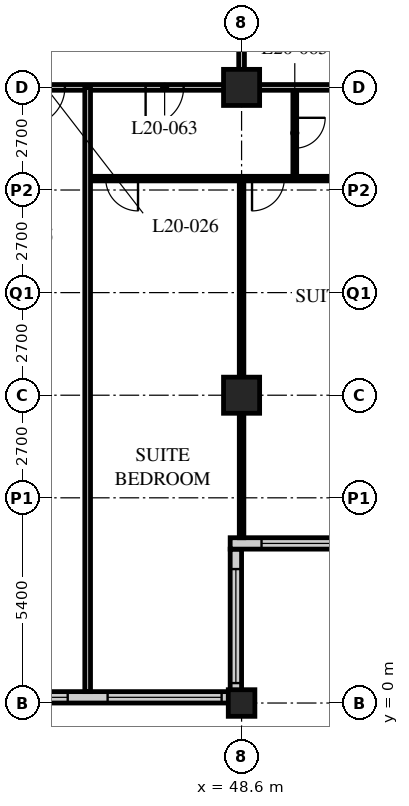
"""IFC4 building model, lengths in metres.
Left out: names, types, materials, properties, quantities, classifications, styles, units other than length and angle.
Written with IfcOpenShell. Run it as: python <this file> out.ifc"""

import sys

from ifc_helpers import new_model, si_unit, direction, frame, frame_2d, origin, origin_2d, place, context, subcontext, project, spatial, rectangle, hollow_rectangle, extrude, element, fill, save


model = new_model("IFC4")
c1 = context("Model", 3, precision=1e-05, world=origin(), true_north=direction((0.0, 1.0)))
c2 = subcontext(c1, "Body", "Model", "MODEL_VIEW")
j1 = project(units=[si_unit("LENGTHUNIT", "METRE"), si_unit("PLANEANGLEUNIT", "RADIAN")], contexts=[c1])
p1 = place(None, origin())
s1 = spatial("IfcSite", under=j1, at=p1, CompositionType="ELEMENT")
p2 = place(p1, origin())
s2 = spatial("IfcBuilding", under=s1, at=p2, CompositionType="ELEMENT")
p3 = place(p2, frame((0.0, 0.0, 80.6)))
s3 = spatial("IfcBuildingStorey", under=s2, at=p3, CompositionType="ELEMENT", Elevation=80.6)
p4 = place(p3, frame((48.6, 0.0, 0.0), z_axis=(0.0, 0.0, 1.0), x_axis=(1.0, 0.0, 0.0)))
e1 = element("IfcColumn", 1, at=p4, inside=s3, PredefinedType="COLUMN", context=c2, shape_type="SweptSolid", body=[
    extrude(hollow_rectangle(XDim=0.7, YDim=0.7, WallThickness=0.06, at=origin_2d()), origin(), (0.0, 0.0, 1.0), 3.4),
])
for number, where, z_axis, x_axis in (
    (2, (48.6, 8.1, 0.0), (0.0, 0.0, 1.0), (1.0, 0.0, 0.0)),
    (3, (48.6, 16.2, 0.0), (0.0, 0.0, 1.0), (1.0, 0.0, 0.0)),
):
    element("IfcColumn", number, at=place(p3, frame(where, z_axis=z_axis, x_axis=x_axis)), inside=s3, PredefinedType="COLUMN", context=c2, shape_type="SweptSolid", body=[
        extrude(hollow_rectangle(XDim=0.95, YDim=0.95, WallThickness=0.095, at=origin_2d()), origin(), (0.0, 0.0, 1.0), 3.4),
    ])
p5 = place(p3, frame((8.4, 0.15, 0.0), z_axis=(0.0, 0.0, 1.0), x_axis=(1.0, 0.0, 0.0)))
e4 = element("IfcWall", 4, at=p5, inside=s3, PredefinedType="SOLIDWALL", context=c2, shape_type="SweptSolid", body=[
    extrude(rectangle(XDim=40.2, YDim=0.3, at=frame_2d((20.1, 0.0))), origin(), (0.0, 0.0, 1.0), 3.19),
])
p6 = place(p5, frame((0.225, 0.0, 0.9)))
e5 = element("IfcOpeningElement", 5, at=p6, cuts=e4, PredefinedType="OPENING", context=c2, shape_type="SweptSolid", body=[
    extrude(rectangle(XDim=3.0, YDim=1.5, at=frame_2d((1.5, 0.75))), frame((0.0, 0.16, 0.0), z_axis=(0.0, -1.0, 0.0), x_axis=(1.0, 0.0, 0.0)), (0.0, 0.0, 1.0), 0.32),
])
p7 = place(p5, frame((4.275, 0.0, 0.9)))
e6 = element("IfcOpeningElement", 6, at=p7, cuts=e4, PredefinedType="OPENING", context=c2, shape_type="SweptSolid", body=[
    extrude(rectangle(XDim=3.0, YDim=1.5, at=frame_2d((1.5, 0.75))), frame((0.0, 0.16, 0.0), z_axis=(0.0, -1.0, 0.0), x_axis=(1.0, 0.0, 0.0)), (0.0, 0.0, 1.0), 0.32),
])
p8 = place(p5, frame((8.325, 0.0, 0.9)))
e7 = element("IfcOpeningElement", 7, at=p8, cuts=e4, PredefinedType="OPENING", context=c2, shape_type="SweptSolid", body=[
    extrude(rectangle(XDim=3.0, YDim=1.5, at=frame_2d((1.5, 0.75))), frame((0.0, 0.16, 0.0), z_axis=(0.0, -1.0, 0.0), x_axis=(1.0, 0.0, 0.0)), (0.0, 0.0, 1.0), 0.32),
])
p9 = place(p5, frame((12.375, 0.0, 0.9)))
e8 = element("IfcOpeningElement", 8, at=p9, cuts=e4, PredefinedType="OPENING", context=c2, shape_type="SweptSolid", body=[
    extrude(rectangle(XDim=3.0, YDim=1.5, at=frame_2d((1.5, 0.75))), frame((0.0, 0.16, 0.0), z_axis=(0.0, -1.0, 0.0), x_axis=(1.0, 0.0, 0.0)), (0.0, 0.0, 1.0), 0.32),
])
p10 = place(p5, frame((16.425, 0.0, 0.9)))
e9 = element("IfcOpeningElement", 9, at=p10, cuts=e4, PredefinedType="OPENING", context=c2, shape_type="SweptSolid", body=[
    extrude(rectangle(XDim=3.0, YDim=1.5, at=frame_2d((1.5, 0.75))), frame((0.0, 0.16, 0.0), z_axis=(0.0, -1.0, 0.0), x_axis=(1.0, 0.0, 0.0)), (0.0, 0.0, 1.0), 0.32),
])
p11 = place(p5, frame((20.475, 0.0, 0.9)))
e10 = element("IfcOpeningElement", 10, at=p11, cuts=e4, PredefinedType="OPENING", context=c2, shape_type="SweptSolid", body=[
    extrude(rectangle(XDim=3.0, YDim=1.5, at=frame_2d((1.5, 0.75))), frame((0.0, 0.16, 0.0), z_axis=(0.0, -1.0, 0.0), x_axis=(1.0, 0.0, 0.0)), (0.0, 0.0, 1.0), 0.32),
])
p12 = place(p5, frame((24.525, 0.0, 0.9)))
e11 = element("IfcOpeningElement", 11, at=p12, cuts=e4, PredefinedType="OPENING", context=c2, shape_type="SweptSolid", body=[
    extrude(rectangle(XDim=3.0, YDim=1.5, at=frame_2d((1.5, 0.75))), frame((0.0, 0.16, 0.0), z_axis=(0.0, -1.0, 0.0), x_axis=(1.0, 0.0, 0.0)), (0.0, 0.0, 1.0), 0.32),
])
p13 = place(p5, frame((28.575, 0.0, 0.9)))
e12 = element("IfcOpeningElement", 12, at=p13, cuts=e4, PredefinedType="OPENING", context=c2, shape_type="SweptSolid", body=[
    extrude(rectangle(XDim=3.0, YDim=1.5, at=frame_2d((1.5, 0.75))), frame((0.0, 0.16, 0.0), z_axis=(0.0, -1.0, 0.0), x_axis=(1.0, 0.0, 0.0)), (0.0, 0.0, 1.0), 0.32),
])
p14 = place(p5, frame((32.625, 0.0, 0.9)))
e13 = element("IfcOpeningElement", 13, at=p14, cuts=e4, PredefinedType="OPENING", context=c2, shape_type="SweptSolid", body=[
    extrude(rectangle(XDim=3.0, YDim=1.5, at=frame_2d((1.5, 0.75))), frame((0.0, 0.16, 0.0), z_axis=(0.0, -1.0, 0.0), x_axis=(1.0, 0.0, 0.0)), (0.0, 0.0, 1.0), 0.32),
])
p15 = place(p5, frame((36.675, 0.0, 0.9)))
e14 = element("IfcOpeningElement", 14, at=p15, cuts=e4, PredefinedType="OPENING", context=c2, shape_type="SweptSolid", body=[
    extrude(rectangle(XDim=3.0, YDim=1.5, at=frame_2d((1.5, 0.75))), frame((0.0, 0.16, 0.0), z_axis=(0.0, -1.0, 0.0), x_axis=(1.0, 0.0, 0.0)), (0.0, 0.0, 1.0), 0.32),
])
p16 = place(p3, frame((48.45, 0.3, 0.0), z_axis=(0.0, 0.0, 1.0), x_axis=(0.0, 1.0, 0.0)))
e15 = element("IfcWall", 15, at=p16, inside=s3, PredefinedType="SOLIDWALL", context=c2, shape_type="SweptSolid", body=[
    extrude(rectangle(XDim=3.75, YDim=0.3, at=frame_2d((1.875, 0.0))), origin(), (0.0, 0.0, 1.0), 3.19),
])
p17 = place(p16, frame((0.225, 0.0, 0.9)))
e16 = element("IfcOpeningElement", 16, at=p17, cuts=e15, PredefinedType="OPENING", context=c2, shape_type="SweptSolid", body=[
    extrude(rectangle(XDim=3.0, YDim=1.5, at=frame_2d((1.5, 0.75))), frame((0.0, 0.16, 0.0), z_axis=(0.0, -1.0, 0.0), x_axis=(1.0, 0.0, 0.0)), (0.0, 0.0, 1.0), 0.32),
])
p18 = place(p3, frame((48.3, 4.2, 0.0), z_axis=(0.0, 0.0, 1.0), x_axis=(1.0, 0.0, 0.0)))
e17 = element("IfcWall", 17, at=p18, inside=s3, PredefinedType="SOLIDWALL", context=c2, shape_type="SweptSolid", body=[
    extrude(rectangle(XDim=4.35, YDim=0.3, at=frame_2d((2.175, 0.0))), origin(), (0.0, 0.0, 1.0), 3.19),
])
p19 = place(p18, frame((0.825, 0.0, 0.9)))
e18 = element("IfcOpeningElement", 18, at=p19, cuts=e17, PredefinedType="OPENING", context=c2, shape_type="SweptSolid", body=[
    extrude(rectangle(XDim=3.0, YDim=1.5, at=frame_2d((1.5, 0.75))), frame((0.0, 0.16, 0.0), z_axis=(0.0, -1.0, 0.0), x_axis=(1.0, 0.0, 0.0)), (0.0, 0.0, 1.0), 0.32),
])
p20 = place(p3, frame((12.15, 16.2, 0.0), z_axis=(0.0, 0.0, 1.0), x_axis=(1.0, 0.0, 0.0)))
e19 = element("IfcWall", 19, at=p20, inside=s3, PredefinedType="PARTITIONING", context=c2, shape_type="SweptSolid", body=[
    extrude(rectangle(XDim=36.45, YDim=0.15, at=frame_2d((18.225, 0.0))), origin(), (0.0, 0.0, 1.0), 2.428),
])
p21 = place(p20, frame((6.5, 0.0, 0.0)))
e20 = element("IfcOpeningElement", 20, at=p21, cuts=e19, PredefinedType="OPENING", context=c2, shape_type="SweptSolid", body=[
    extrude(rectangle(XDim=1.0, YDim=2.1, at=frame_2d((0.5, 1.05))), frame((0.0, 0.085, 0.0), z_axis=(0.0, -1.0, 0.0), x_axis=(1.0, 0.0, 0.0)), (0.0, 0.0, 1.0), 0.17),
])
p22 = place(p20, frame((8.4, 0.0, 0.0)))
e21 = element("IfcOpeningElement", 21, at=p22, cuts=e19, PredefinedType="OPENING", context=c2, shape_type="SweptSolid", body=[
    extrude(rectangle(XDim=1.0, YDim=2.1, at=frame_2d((0.5, 1.05))), frame((0.0, 0.085, 0.0), z_axis=(0.0, -1.0, 0.0), x_axis=(1.0, 0.0, 0.0)), (0.0, 0.0, 1.0), 0.17),
])
p23 = place(p20, frame((14.9, 0.0, 0.0)))
e22 = element("IfcOpeningElement", 22, at=p23, cuts=e19, PredefinedType="OPENING", context=c2, shape_type="SweptSolid", body=[
    extrude(rectangle(XDim=1.0, YDim=2.1, at=frame_2d((0.5, 1.05))), frame((0.0, 0.085, 0.0), z_axis=(0.0, -1.0, 0.0), x_axis=(1.0, 0.0, 0.0)), (0.0, 0.0, 1.0), 0.17),
])
p24 = place(p20, frame((16.5, 0.0, 0.0)))
e23 = element("IfcOpeningElement", 23, at=p24, cuts=e19, PredefinedType="OPENING", context=c2, shape_type="SweptSolid", body=[
    extrude(rectangle(XDim=1.0, YDim=2.1, at=frame_2d((0.5, 1.05))), frame((0.0, 0.085, 0.0), z_axis=(0.0, -1.0, 0.0), x_axis=(1.0, 0.0, 0.0)), (0.0, 0.0, 1.0), 0.17),
])
p25 = place(p20, frame((22.7, 0.0, 0.0)))
e24 = element("IfcOpeningElement", 24, at=p25, cuts=e19, PredefinedType="OPENING", context=c2, shape_type="SweptSolid", body=[
    extrude(rectangle(XDim=1.0, YDim=2.1, at=frame_2d((0.5, 1.05))), frame((0.0, 0.085, 0.0), z_axis=(0.0, -1.0, 0.0), x_axis=(1.0, 0.0, 0.0)), (0.0, 0.0, 1.0), 0.17),
])
p26 = place(p20, frame((24.9, 0.0, 0.0)))
e25 = element("IfcOpeningElement", 25, at=p26, cuts=e19, PredefinedType="OPENING", context=c2, shape_type="SweptSolid", body=[
    extrude(rectangle(XDim=1.0, YDim=2.1, at=frame_2d((0.5, 1.05))), frame((0.0, 0.085, 0.0), z_axis=(0.0, -1.0, 0.0), x_axis=(1.0, 0.0, 0.0)), (0.0, 0.0, 1.0), 0.17),
])
p27 = place(p20, frame((30.8, 0.0, 0.0)))
e26 = element("IfcOpeningElement", 26, at=p27, cuts=e19, PredefinedType="OPENING", context=c2, shape_type="SweptSolid", body=[
    extrude(rectangle(XDim=1.0, YDim=2.1, at=frame_2d((0.5, 1.05))), frame((0.0, 0.085, 0.0), z_axis=(0.0, -1.0, 0.0), x_axis=(1.0, 0.0, 0.0)), (0.0, 0.0, 1.0), 0.17),
])
p28 = place(p20, frame((1.525, 0.0, 0.0)))
e27 = element("IfcOpeningElement", 27, at=p28, cuts=e19, PredefinedType="OPENING", context=c2, shape_type="SweptSolid", body=[
    extrude(rectangle(XDim=1.0, YDim=2.1, at=frame_2d((0.5, 1.05))), frame((0.0, 0.085, 0.0), z_axis=(0.0, -1.0, 0.0), x_axis=(1.0, 0.0, 0.0)), (0.0, 0.0, 1.0), 0.17),
])
p29 = place(p20, frame((33.925, 0.0, 0.0)))
e28 = element("IfcOpeningElement", 28, at=p29, cuts=e19, PredefinedType="OPENING", context=c2, shape_type="SweptSolid", body=[
    extrude(rectangle(XDim=1.0, YDim=2.1, at=frame_2d((0.5, 1.05))), frame((0.0, 0.085, 0.0), z_axis=(0.0, -1.0, 0.0), x_axis=(1.0, 0.0, 0.0)), (0.0, 0.0, 1.0), 0.17),
])
p30 = place(p3, frame((48.6, 16.2, 0.0), z_axis=(0.0, 0.0, 1.0), x_axis=(0.0, 1.0, 0.0)))
e29 = element("IfcWall", 29, at=p30, inside=s3, PredefinedType="PARTITIONING", context=c2, shape_type="SweptSolid", body=[
    extrude(rectangle(XDim=26.1, YDim=0.15, at=frame_2d((13.05, 0.0))), origin(), (0.0, 0.0, 1.0), 2.428),
])
p31 = place(p30, frame((2.75, 0.0, 0.0)))
e30 = element("IfcOpeningElement", 30, at=p31, cuts=e29, PredefinedType="OPENING", context=c2, shape_type="SweptSolid", body=[
    extrude(rectangle(XDim=1.0, YDim=2.1, at=frame_2d((0.5, 1.05))), frame((0.0, 0.085, 0.0), z_axis=(0.0, -1.0, 0.0), x_axis=(1.0, 0.0, 0.0)), (0.0, 0.0, 1.0), 0.17),
])
p32 = place(p30, frame((4.65, 0.0, 0.0)))
e31 = element("IfcOpeningElement", 31, at=p32, cuts=e29, PredefinedType="OPENING", context=c2, shape_type="SweptSolid", body=[
    extrude(rectangle(XDim=1.0, YDim=2.1, at=frame_2d((0.5, 1.05))), frame((0.0, 0.085, 0.0), z_axis=(0.0, -1.0, 0.0), x_axis=(1.0, 0.0, 0.0)), (0.0, 0.0, 1.0), 0.17),
])
p33 = place(p30, frame((13.55, 0.0, 0.0)))
e32 = element("IfcOpeningElement", 32, at=p33, cuts=e29, PredefinedType="OPENING", context=c2, shape_type="SweptSolid", body=[
    extrude(rectangle(XDim=1.0, YDim=2.1, at=frame_2d((0.5, 1.05))), frame((0.0, 0.085, 0.0), z_axis=(0.0, -1.0, 0.0), x_axis=(1.0, 0.0, 0.0)), (0.0, 0.0, 1.0), 0.17),
])
p34 = place(p30, frame((21.65, 0.0, 0.0)))
e33 = element("IfcOpeningElement", 33, at=p34, cuts=e29, PredefinedType="OPENING", context=c2, shape_type="SweptSolid", body=[
    extrude(rectangle(XDim=1.0, YDim=2.1, at=frame_2d((0.5, 1.05))), frame((0.0, 0.085, 0.0), z_axis=(0.0, -1.0, 0.0), x_axis=(1.0, 0.0, 0.0)), (0.0, 0.0, 1.0), 0.17),
])
p35 = place(p3, frame((44.55, 13.8, 0.0), z_axis=(0.0, 0.0, 1.0), x_axis=(1.0, 0.0, 0.0)))
e34 = element("IfcWall", 34, at=p35, inside=s3, PredefinedType="PARTITIONING", context=c2, shape_type="SweptSolid", body=[
    extrude(rectangle(XDim=8.05, YDim=0.12, at=frame_2d((4.025, 0.0))), origin(), (0.0, 0.0, 1.0), 3.19),
])
p36 = place(p35, frame((0.475, 0.0, 0.0)))
e35 = element("IfcOpeningElement", 35, at=p36, cuts=e34, PredefinedType="OPENING", context=c2, shape_type="SweptSolid", body=[
    extrude(rectangle(XDim=0.85, YDim=2.1, at=frame_2d((0.425, 1.05))), frame((0.0, 0.07, 0.0), z_axis=(0.0, -1.0, 0.0), x_axis=(1.0, 0.0, 0.0)), (0.0, 0.0, 1.0), 0.14),
])
p37 = place(p35, frame((4.325, 0.0, 0.0)))
e36 = element("IfcOpeningElement", 36, at=p37, cuts=e34, PredefinedType="OPENING", context=c2, shape_type="SweptSolid", body=[
    extrude(rectangle(XDim=0.85, YDim=2.1, at=frame_2d((0.425, 1.05))), frame((0.0, 0.07, 0.0), z_axis=(0.0, -1.0, 0.0), x_axis=(1.0, 0.0, 0.0)), (0.0, 0.0, 1.0), 0.14),
])
p38 = place(p3, frame((50.0, 16.2, 0.0), z_axis=(0.0, 0.0, 1.0), x_axis=(0.0, -1.0, 0.0)))
e37 = element("IfcWall", 37, at=p38, inside=s3, PredefinedType="PARTITIONING", context=c2, shape_type="SweptSolid", body=[
    extrude(rectangle(XDim=2.4, YDim=0.1, at=frame_2d((1.2, 0.0))), origin(), (0.0, 0.0, 1.0), 3.19),
])
p39 = place(p38, frame((0.8, 0.0, 0.0)))
e38 = element("IfcOpeningElement", 38, at=p39, cuts=e37, PredefinedType="OPENING", context=c2, shape_type="SweptSolid", body=[
    extrude(rectangle(XDim=0.8, YDim=2.1, at=frame_2d((0.4, 1.05))), frame((0.0, 0.06, 0.0), z_axis=(0.0, -1.0, 0.0), x_axis=(1.0, 0.0, 0.0)), (0.0, 0.0, 1.0), 0.12),
])
p40 = place(p3, frame((48.6, 13.8, 0.0), z_axis=(0.0, 0.0, 1.0), x_axis=(0.0, -1.0, 0.0)))
e39 = element("IfcWall", 39, at=p40, inside=s3, PredefinedType="PARTITIONING", context=c2, shape_type="SweptSolid", body=[
    extrude(rectangle(XDim=9.45, YDim=0.12, at=frame_2d((4.725, 0.0))), origin(), (0.0, 0.0, 1.0), 2.428),
])
p41 = place(p3, frame((48.6, 16.2, 0.0), z_axis=(0.0, 0.0, 1.0), x_axis=(1.0, 0.0, 0.0)))
e40 = element("IfcWall", 40, at=p41, inside=s3, PredefinedType="PARTITIONING", context=c2, shape_type="SweptSolid", body=[
    extrude(rectangle(XDim=7.8, YDim=0.15, at=frame_2d((3.9, 0.0))), origin(), (0.0, 0.0, 1.0), 2.428),
])
p42 = place(p3, frame((44.55, 16.2, 0.0), z_axis=(0.0, 0.0, 1.0), x_axis=(0.0, -1.0, 0.0)))
e41 = element("IfcWall", 41, at=p42, inside=s3, PredefinedType="PARTITIONING", context=c2, shape_type="SweptSolid", body=[
    extrude(rectangle(XDim=15.9, YDim=0.15, at=frame_2d((7.95, 0.0))), origin(), (0.0, 0.0, 1.0), 3.19),
])
p43 = place(p14, origin())
e42 = element("IfcWindow", 42, at=p43, inside=s3, PartitioningType="SINGLE_PANEL", PredefinedType="WINDOW", context=c2, shape_type="SweptSolid", body=[
    extrude(rectangle(XDim=3.0, YDim=1.5, at=frame_2d((1.5, 0.75))), frame((0.0, 0.03, 0.0), z_axis=(0.0, -1.0, 0.0), x_axis=(1.0, 0.0, 0.0)), (0.0, 0.0, 1.0), 0.06),
])
fill(e13, e42)
p44 = place(p15, origin())
e43 = element("IfcWindow", 43, at=p44, inside=s3, PartitioningType="SINGLE_PANEL", PredefinedType="WINDOW", context=c2, shape_type="SweptSolid", body=[
    extrude(rectangle(XDim=3.0, YDim=1.5, at=frame_2d((1.5, 0.75))), frame((0.0, 0.03, 0.0), z_axis=(0.0, -1.0, 0.0), x_axis=(1.0, 0.0, 0.0)), (0.0, 0.0, 1.0), 0.06),
])
fill(e14, e43)
p45 = place(p17, origin())
e44 = element("IfcWindow", 44, at=p45, inside=s3, PartitioningType="SINGLE_PANEL", PredefinedType="WINDOW", context=c2, shape_type="SweptSolid", body=[
    extrude(rectangle(XDim=3.0, YDim=1.5, at=frame_2d((1.5, 0.75))), frame((0.0, 0.03, 0.0), z_axis=(0.0, -1.0, 0.0), x_axis=(1.0, 0.0, 0.0)), (0.0, 0.0, 1.0), 0.06),
])
fill(e16, e44)
p46 = place(p19, origin())
e45 = element("IfcWindow", 45, at=p46, inside=s3, PartitioningType="SINGLE_PANEL", PredefinedType="WINDOW", context=c2, shape_type="SweptSolid", body=[
    extrude(rectangle(XDim=3.0, YDim=1.5, at=frame_2d((1.5, 0.75))), frame((0.0, 0.03, 0.0), z_axis=(0.0, -1.0, 0.0), x_axis=(1.0, 0.0, 0.0)), (0.0, 0.0, 1.0), 0.06),
])
fill(e18, e45)
p47 = place(p27, origin())
e46 = element("IfcDoor", 46, at=p47, inside=s3, OperationType="SINGLE_SWING_RIGHT", PredefinedType="DOOR", context=c2, shape_type="SweptSolid", body=[
    extrude(rectangle(XDim=1.0, YDim=2.1, at=frame_2d((0.5, 1.05))), frame((0.0, 0.025, 0.0), z_axis=(0.0, -1.0, 0.0), x_axis=(1.0, 0.0, 0.0)), (0.0, 0.0, 1.0), 0.05),
])
fill(e26, e46)
p48 = place(p29, origin())
e47 = element("IfcDoor", 47, at=p48, inside=s3, OperationType="SINGLE_SWING_RIGHT", PredefinedType="DOOR", context=c2, shape_type="SweptSolid", body=[
    extrude(rectangle(XDim=1.0, YDim=2.1, at=frame_2d((0.5, 1.05))), frame((0.0, 0.025, 0.0), z_axis=(0.0, -1.0, 0.0), x_axis=(1.0, 0.0, 0.0)), (0.0, 0.0, 1.0), 0.05),
])
fill(e28, e47)
p49 = place(p36, origin())
e48 = element("IfcDoor", 48, at=p49, inside=s3, OperationType="SINGLE_SWING_LEFT", PredefinedType="DOOR", context=c2, shape_type="SweptSolid", body=[
    extrude(rectangle(XDim=0.85, YDim=2.1, at=frame_2d((0.425, 1.05))), frame((0.0, 0.025, 0.0), z_axis=(0.0, -1.0, 0.0), x_axis=(1.0, 0.0, 0.0)), (0.0, 0.0, 1.0), 0.05),
])
fill(e35, e48)
p50 = place(p39, origin())
e49 = element("IfcDoor", 49, at=p50, inside=s3, OperationType="SINGLE_SWING_LEFT", PredefinedType="DOOR", context=c2, shape_type="SweptSolid", body=[
    extrude(rectangle(XDim=0.8, YDim=2.1, at=frame_2d((0.4, 1.05))), frame((0.0, 0.025, 0.0), z_axis=(0.0, -1.0, 0.0), x_axis=(1.0, 0.0, 0.0)), (0.0, 0.0, 1.0), 0.05),
])
fill(e38, e49)
p51 = place(p37, origin())
e50 = element("IfcDoor", 50, at=p51, inside=s3, OperationType="SINGLE_SWING_RIGHT", PredefinedType="DOOR", context=c2, shape_type="SweptSolid", body=[
    extrude(rectangle(XDim=0.85, YDim=2.1, at=frame_2d((0.425, 1.05))), frame((0.0, 0.025, 0.0), z_axis=(0.0, -1.0, 0.0), x_axis=(1.0, 0.0, 0.0)), (0.0, 0.0, 1.0), 0.05),
])
fill(e36, e50)
save(model, sys.argv[1])
